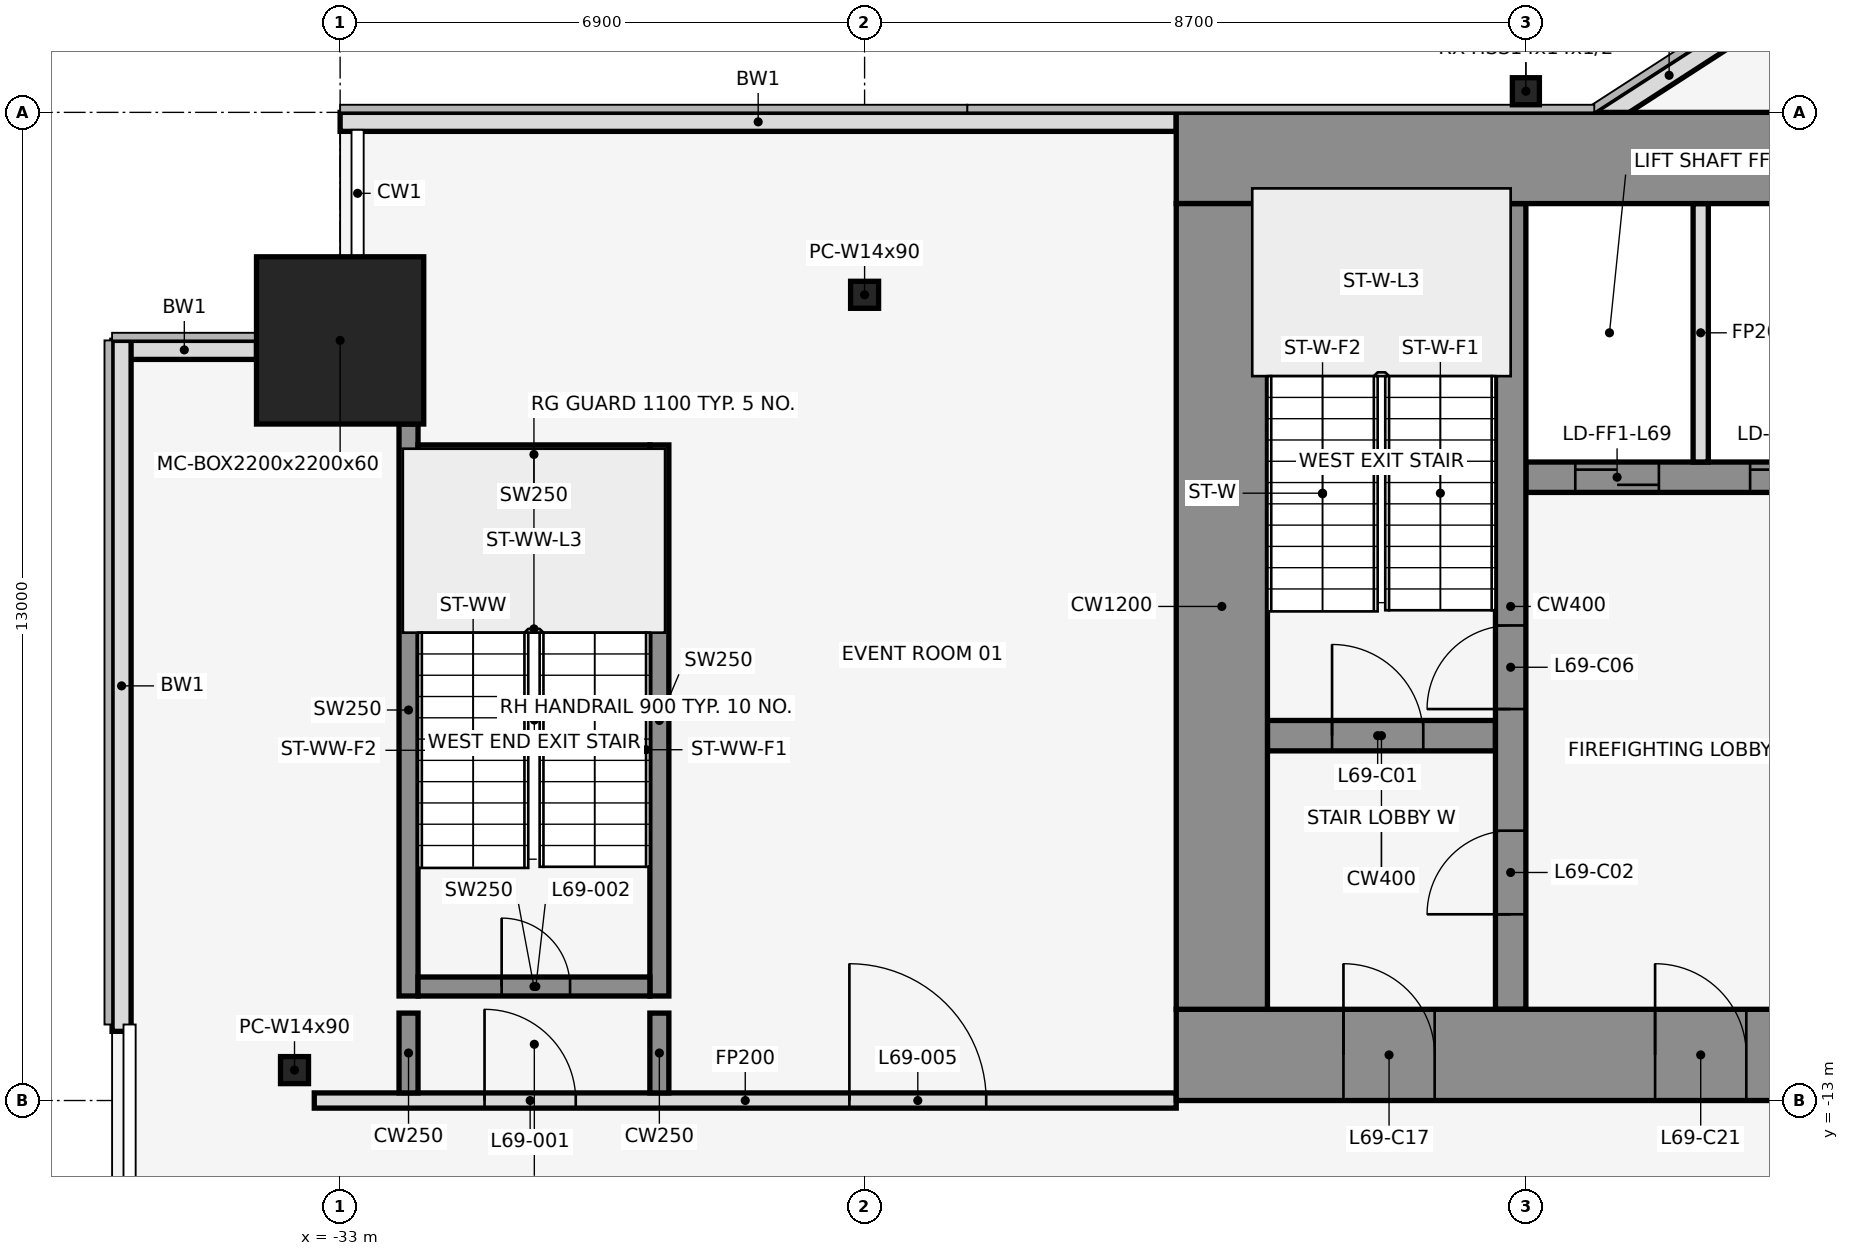
"""IFC4 building model, lengths in metres.
Left out: names, types, materials, properties, quantities, classifications, styles, units other than length and angle.
Written with IfcOpenShell. Run it as: python <this file> out.ifc"""

import sys

from ifc_helpers import new_model, si_unit, direction, frame, frame_2d, origin, origin_2d, place, context, subcontext, project, spatial, rectangle, hollow_rectangle, i_section, extrude, element, fill, save


model = new_model("IFC4")
c1 = context("Model", 3, precision=1e-05, world=origin(), true_north=direction((0.0, 1.0)))
c2 = subcontext(c1, "Body", "Model", "MODEL_VIEW")
j1 = project(units=[si_unit("LENGTHUNIT", "METRE"), si_unit("PLANEANGLEUNIT", "RADIAN")], contexts=[c1])
p1 = place(None, origin())
s1 = spatial("IfcSite", under=j1, at=p1, CompositionType="ELEMENT")
p2 = place(p1, origin())
s2 = spatial("IfcBuilding", under=s1, at=p2, CompositionType="ELEMENT")
p3 = place(p2, frame((0.0, 0.0, 306.5)))
s3 = spatial("IfcBuildingStorey", under=s2, at=p3, CompositionType="ELEMENT", Elevation=306.5)
p4 = place(p3, frame((-33.0, -3.0, 0.0), z_axis=(0.0, 0.0, 1.0), x_axis=(1.0, 0.0, 0.0)))
e1 = element("IfcColumn", 1, at=p4, inside=s3, PredefinedType="COLUMN", context=c2, shape_type="SweptSolid", body=[
    extrude(hollow_rectangle(XDim=2.2, YDim=2.2, WallThickness=0.06, at=origin_2d()), origin(), (0.0, 0.0, 1.0), 4.5),
])
p5 = place(p3, frame((-26.1, -2.4, 0.0), z_axis=(0.0, 0.0, 1.0), x_axis=(1.0, 0.0, 0.0)))
e2 = element("IfcColumn", 2, at=p5, inside=s3, PredefinedType="COLUMN", context=c2, shape_type="SweptSolid", body=[
    extrude(i_section(OverallWidth=0.368, OverallDepth=0.356, WebThickness=0.011, FlangeThickness=0.018, at=origin_2d()), origin(), (0.0, 0.0, 1.0), 4.5),
])
p6 = place(p3, frame((-17.4, 0.278, 0.0), z_axis=(0.0, 0.0, 1.0), x_axis=(1.0, 0.0, 0.0)))
e3 = element("IfcColumn", 3, at=p6, inside=s3, PredefinedType="COLUMN", context=c2, shape_type="SweptSolid", body=[
    extrude(hollow_rectangle(XDim=0.356, YDim=0.356, WallThickness=0.012, at=origin_2d()), origin(), (0.0, 0.0, 1.0), 4.5),
])
p7 = place(p3, frame((-33.6, -12.6, 0.0), z_axis=(0.0, 0.0, 1.0), x_axis=(1.0, 0.0, 0.0)))
e4 = element("IfcColumn", 4, at=p7, inside=s3, PredefinedType="COLUMN", context=c2, shape_type="SweptSolid", body=[
    extrude(i_section(OverallWidth=0.368, OverallDepth=0.356, WebThickness=0.011, FlangeThickness=0.018, at=origin_2d()), origin(), (0.0, 0.0, 1.0), 4.5),
])
p8 = place(p3, frame((-14.599, 1.08, 0.0), z_axis=(0.0, 0.0, 1.0), x_axis=(-0.83981312244, -0.542875602121, 0.0)))
e5 = element("IfcWall", 5, at=p8, inside=s3, PredefinedType="STANDARD", context=c2, shape_type="SweptSolid", body=[
    extrude(rectangle(XDim=2.183, YDim=0.25, at=frame_2d((1.091, 0.0))), origin(), (0.0, 0.0, 1.0), 4.35),
])
p9 = place(p3, frame((-22.0, -0.125, 0.0), z_axis=(0.0, 0.0, 1.0), x_axis=(-1.0, 0.0, 0.0)))
e6 = element("IfcWall", 6, at=p9, inside=s3, PredefinedType="STANDARD", context=c2, shape_type="SweptSolid", body=[
    extrude(rectangle(XDim=11.0, YDim=0.25, at=frame_2d((5.5, 0.0))), origin(), (0.0, 0.0, 1.0), 4.35),
])
p10 = place(p3, frame((-34.1, -3.125, 0.0), z_axis=(0.0, 0.0, 1.0), x_axis=(-1.0, 0.0, 0.0)))
e7 = element("IfcWall", 7, at=p10, inside=s3, PredefinedType="STANDARD", context=c2, shape_type="SweptSolid", body=[
    extrude(rectangle(XDim=1.9, YDim=0.25, at=frame_2d((0.95, 0.0))), origin(), (0.0, 0.0, 1.0), 4.35),
])
p11 = place(p3, frame((-35.875, -3.0, 0.0), z_axis=(0.0, 0.0, 1.0), x_axis=(0.0, -1.0, 0.0)))
e8 = element("IfcWall", 8, at=p11, inside=s3, PredefinedType="STANDARD", context=c2, shape_type="SweptSolid", body=[
    extrude(rectangle(XDim=9.09, YDim=0.25, at=frame_2d((4.545, 0.0))), origin(), (0.0, 0.0, 1.0), 4.35),
])
p12 = place(p3, frame((-32.1, -11.625, 0.0), z_axis=(0.0, 0.0, 1.0), x_axis=(0.0, 1.0, 0.0)))
e9 = element("IfcWall", 9, at=p12, inside=s3, PredefinedType="SHEAR", context=c2, shape_type="SweptSolid", body=[
    extrude(rectangle(XDim=7.525, YDim=0.25, at=frame_2d((3.762, 0.0))), origin(), (0.0, 0.0, 1.0), 4.5),
])
p13 = place(p3, frame((-28.8, -11.625, 0.0), z_axis=(0.0, 0.0, 1.0), x_axis=(0.0, 1.0, 0.0)))
e10 = element("IfcWall", 10, at=p13, inside=s3, PredefinedType="SHEAR", context=c2, shape_type="SweptSolid", body=[
    extrude(rectangle(XDim=7.25, YDim=0.25, at=frame_2d((3.625, 0.0))), origin(), (0.0, 0.0, 1.0), 4.5),
])
p14 = place(p3, frame((-31.975, -11.5, 0.0), z_axis=(0.0, 0.0, 1.0), x_axis=(1.0, 0.0, 0.0)))
e11 = element("IfcWall", 11, at=p14, inside=s3, PredefinedType="SHEAR", context=c2, shape_type="SweptSolid", body=[
    extrude(rectangle(XDim=3.05, YDim=0.25, at=frame_2d((1.525, 0.0))), origin(), (0.0, 0.0, 1.0), 4.5),
])
p15 = place(p14, frame((1.1, 0.0, 0.0)))
e12 = element("IfcOpeningElement", 12, at=p15, cuts=e11, PredefinedType="OPENING", context=c2, shape_type="SweptSolid", body=[
    extrude(rectangle(XDim=0.9, YDim=2.1, at=frame_2d((0.45, 1.05))), frame((0.0, 0.137, 0.0), z_axis=(0.0, -1.0, 0.0), x_axis=(1.0, 0.0, 0.0)), (0.0, 0.0, 1.0), 0.274),
])
p16 = place(p3, frame((-31.975, -4.5, 0.0), z_axis=(0.0, 0.0, 1.0), x_axis=(1.0, 0.0, 0.0)))
e13 = element("IfcWall", 13, at=p16, inside=s3, PredefinedType="SHEAR", context=c2, shape_type="SweptSolid", body=[
    extrude(rectangle(XDim=3.05, YDim=0.25, at=frame_2d((1.525, 0.0))), origin(), (0.0, 0.0, 1.0), 4.5),
])
p17 = place(p3, frame((-33.34, -13.0, 0.0), z_axis=(0.0, 0.0, 1.0), x_axis=(1.0, 0.0, 0.0)))
e14 = element("IfcWall", 14, at=p17, inside=s3, PredefinedType="PARTITIONING", context=c2, shape_type="SweptSolid", body=[
    extrude(rectangle(XDim=11.34, YDim=0.2, at=frame_2d((5.67, 0.0))), origin(), (0.0, 0.0, 1.0), 3.418),
])
p18 = place(p17, frame((2.24, 0.0, 0.0)))
e15 = element("IfcOpeningElement", 15, at=p18, cuts=e14, PredefinedType="OPENING", context=c2, shape_type="SweptSolid", body=[
    extrude(rectangle(XDim=1.2, YDim=2.1, at=frame_2d((0.6, 1.05))), frame((0.0, 0.112, 0.0), z_axis=(0.0, -1.0, 0.0), x_axis=(1.0, 0.0, 0.0)), (0.0, 0.0, 1.0), 0.224),
])
p19 = place(p17, frame((7.04, 0.0, 0.0)))
e16 = element("IfcOpeningElement", 16, at=p19, cuts=e14, PredefinedType="OPENING", context=c2, shape_type="SweptSolid", body=[
    extrude(rectangle(XDim=1.8, YDim=2.1, at=frame_2d((0.9, 1.05))), frame((0.0, 0.112, 0.0), z_axis=(0.0, -1.0, 0.0), x_axis=(1.0, 0.0, 0.0)), (0.0, 0.0, 1.0), 0.224),
])
for number, where, z_axis, x_axis in (
    (17, (-32.1, -12.9, 0.0), (0.0, 0.0, 1.0), (0.0, 1.0, 0.0)),
    (18, (-28.8, -12.9, 0.0), (0.0, 0.0, 1.0), (0.0, 1.0, 0.0)),
):
    element("IfcWall", number, at=place(p3, frame(where, z_axis=z_axis, x_axis=x_axis)), inside=s3, PredefinedType="SHEAR", context=c2, shape_type="SweptSolid", body=[
        extrude(rectangle(XDim=1.05, YDim=0.25, at=frame_2d((0.525, 0.0))), origin(), (0.0, 0.0, 1.0), 4.5),
    ])
p20 = place(p3, frame((-20.8, -8.2, 0.0), z_axis=(0.0, 0.0, 1.0), x_axis=(1.0, 0.0, 0.0)))
e19 = element("IfcWall", 19, at=p20, inside=s3, PredefinedType="SHEAR", context=c2, shape_type="SweptSolid", body=[
    extrude(rectangle(XDim=3.0, YDim=0.4, at=frame_2d((1.5, 0.0))), origin(), (0.0, 0.0, 1.0), 4.5),
])
p21 = place(p20, frame((0.85, 0.0, 0.0)))
e20 = element("IfcOpeningElement", 20, at=p21, cuts=e19, PredefinedType="OPENING", context=c2, shape_type="SweptSolid", body=[
    extrude(rectangle(XDim=1.2, YDim=2.1, at=frame_2d((0.6, 1.05))), frame((0.0, 0.212, 0.0), z_axis=(0.0, -1.0, 0.0), x_axis=(1.0, 0.0, 0.0)), (0.0, 0.0, 1.0), 0.424),
])
p22 = place(p3, frame((-17.4, -4.8, 0.0), z_axis=(0.0, 0.0, 1.0), x_axis=(1.0, 0.0, 0.0)))
e21 = element("IfcWall", 21, at=p22, inside=s3, PredefinedType="SHEAR", context=c2, shape_type="SweptSolid", body=[
    extrude(rectangle(XDim=13.6, YDim=0.4, at=frame_2d((6.8, 0.0))), origin(), (0.0, 0.0, 1.0), 4.5),
])
p23 = place(p22, frame((0.65, 0.0, 0.0)))
e22 = element("IfcOpeningElement", 22, at=p23, cuts=e21, PredefinedType="OPENING", context=c2, shape_type="SweptSolid", body=[
    extrude(rectangle(XDim=1.1, YDim=2.1, at=frame_2d((0.55, 1.05))), frame((0.0, 0.212, 0.0), z_axis=(0.0, -1.0, 0.0), x_axis=(1.0, 0.0, 0.0)), (0.0, 0.0, 1.0), 0.424),
])
p24 = place(p22, frame((2.95, 0.0, 0.0)))
e23 = element("IfcOpeningElement", 23, at=p24, cuts=e21, PredefinedType="OPENING", context=c2, shape_type="SweptSolid", body=[
    extrude(rectangle(XDim=1.1, YDim=2.1, at=frame_2d((0.55, 1.05))), frame((0.0, 0.212, 0.0), z_axis=(0.0, -1.0, 0.0), x_axis=(1.0, 0.0, 0.0)), (0.0, 0.0, 1.0), 0.424),
])
p25 = place(p22, frame((8.75, 0.0, 0.0)))
e24 = element("IfcOpeningElement", 24, at=p25, cuts=e21, PredefinedType="OPENING", context=c2, shape_type="SweptSolid", body=[
    extrude(rectangle(XDim=0.9, YDim=2.1, at=frame_2d((0.45, 1.05))), frame((0.0, 0.212, 0.0), z_axis=(0.0, -1.0, 0.0), x_axis=(1.0, 0.0, 0.0)), (0.0, 0.0, 1.0), 0.424),
])
p26 = place(p3, frame((-17.6, -11.8, 0.0), z_axis=(0.0, 0.0, 1.0), x_axis=(0.0, 1.0, 0.0)))
e25 = element("IfcWall", 25, at=p26, inside=s3, PredefinedType="SHEAR", context=c2, shape_type="SweptSolid", body=[
    extrude(rectangle(XDim=10.6, YDim=0.4, at=frame_2d((5.3, 0.0))), origin(), (0.0, 0.0, 1.0), 4.5),
])
p27 = place(p26, frame((1.25, 0.0, 0.0)))
e26 = element("IfcOpeningElement", 26, at=p27, cuts=e25, PredefinedType="OPENING", context=c2, shape_type="SweptSolid", body=[
    extrude(rectangle(XDim=1.1, YDim=2.1, at=frame_2d((0.55, 1.05))), frame((0.0, 0.212, 0.0), z_axis=(0.0, -1.0, 0.0), x_axis=(1.0, 0.0, 0.0)), (0.0, 0.0, 1.0), 0.424),
])
p28 = place(p26, frame((3.95, 0.0, 0.0)))
e27 = element("IfcOpeningElement", 27, at=p28, cuts=e25, PredefinedType="OPENING", context=c2, shape_type="SweptSolid", body=[
    extrude(rectangle(XDim=1.1, YDim=2.1, at=frame_2d((0.55, 1.05))), frame((0.0, 0.212, 0.0), z_axis=(0.0, -1.0, 0.0), x_axis=(1.0, 0.0, 0.0)), (0.0, 0.0, 1.0), 0.424),
])
p29 = place(p3, frame((-15.1, -4.6, 0.0), z_axis=(0.0, 0.0, 1.0), x_axis=(0.0, 1.0, 0.0)))
e28 = element("IfcWall", 28, at=p29, inside=s3, PredefinedType="PARTITIONING", context=c2, shape_type="SweptSolid", body=[
    extrude(rectangle(XDim=3.4, YDim=0.2, at=frame_2d((1.7, 0.0))), origin(), (0.0, 0.0, 1.0), 3.418),
])
p30 = place(p3, frame((-22.0, -0.6, 0.0), z_axis=(0.0, 0.0, 1.0), x_axis=(1.0, 0.0, 0.0)))
e29 = element("IfcWall", 29, at=p30, inside=s3, PredefinedType="SHEAR", context=c2, shape_type="SweptSolid", body=[
    extrude(rectangle(XDim=44.0, YDim=1.2, at=frame_2d((22.0, 0.0))), origin(), (0.0, 0.0, 1.0), 4.5),
])
p31 = place(p30, frame((18.55, 0.0, 0.0)))
e30 = element("IfcOpeningElement", 30, at=p31, cuts=e29, PredefinedType="OPENING", context=c2, shape_type="SweptSolid", body=[
    extrude(rectangle(XDim=0.9, YDim=2.1, at=frame_2d((0.45, 1.05))), frame((0.0, 0.612, 0.0), z_axis=(0.0, -1.0, 0.0), x_axis=(1.0, 0.0, 0.0)), (0.0, 0.0, 1.0), 1.224),
])
p32 = place(p30, frame((24.55, 0.0, 0.0)))
e31 = element("IfcOpeningElement", 31, at=p32, cuts=e29, PredefinedType="OPENING", context=c2, shape_type="SweptSolid", body=[
    extrude(rectangle(XDim=0.9, YDim=2.1, at=frame_2d((0.45, 1.05))), frame((0.0, 0.612, 0.0), z_axis=(0.0, -1.0, 0.0), x_axis=(1.0, 0.0, 0.0)), (0.0, 0.0, 1.0), 1.224),
])
p33 = place(p3, frame((-22.0, -12.4, 0.0), z_axis=(0.0, 0.0, 1.0), x_axis=(1.0, 0.0, 0.0)))
e32 = element("IfcWall", 32, at=p33, inside=s3, PredefinedType="SHEAR", context=c2, shape_type="SweptSolid", body=[
    extrude(rectangle(XDim=44.0, YDim=1.2, at=frame_2d((22.0, 0.0))), origin(), (0.0, 0.0, 1.0), 4.5),
])
p34 = place(p33, frame((2.2, 0.0, 0.0)))
e33 = element("IfcOpeningElement", 33, at=p34, cuts=e32, PredefinedType="OPENING", context=c2, shape_type="SweptSolid", body=[
    extrude(rectangle(XDim=1.2, YDim=2.1, at=frame_2d((0.6, 1.05))), frame((0.0, 0.612, 0.0), z_axis=(0.0, -1.0, 0.0), x_axis=(1.0, 0.0, 0.0)), (0.0, 0.0, 1.0), 1.224),
])
p35 = place(p33, frame((21.4, 0.0, 0.0)))
e34 = element("IfcOpeningElement", 34, at=p35, cuts=e32, PredefinedType="OPENING", context=c2, shape_type="SweptSolid", body=[
    extrude(rectangle(XDim=1.2, YDim=2.1, at=frame_2d((0.6, 1.05))), frame((0.0, 0.612, 0.0), z_axis=(0.0, -1.0, 0.0), x_axis=(1.0, 0.0, 0.0)), (0.0, 0.0, 1.0), 1.224),
])
p36 = place(p33, frame((40.6, 0.0, 0.0)))
e35 = element("IfcOpeningElement", 35, at=p36, cuts=e32, PredefinedType="OPENING", context=c2, shape_type="SweptSolid", body=[
    extrude(rectangle(XDim=1.2, YDim=2.1, at=frame_2d((0.6, 1.05))), frame((0.0, 0.612, 0.0), z_axis=(0.0, -1.0, 0.0), x_axis=(1.0, 0.0, 0.0)), (0.0, 0.0, 1.0), 1.224),
])
p37 = place(p33, frame((16.0, 0.0, 0.0)))
e36 = element("IfcOpeningElement", 36, at=p37, cuts=e32, PredefinedType="OPENING", context=c2, shape_type="SweptSolid", body=[
    extrude(rectangle(XDim=1.8, YDim=2.1, at=frame_2d((0.9, 1.05))), frame((0.0, 0.612, 0.0), z_axis=(0.0, -1.0, 0.0), x_axis=(1.0, 0.0, 0.0)), (0.0, 0.0, 1.0), 1.224),
])
p38 = place(p33, frame((6.3, 0.0, 0.0)))
e37 = element("IfcOpeningElement", 37, at=p38, cuts=e32, PredefinedType="OPENING", context=c2, shape_type="SweptSolid", body=[
    extrude(rectangle(XDim=1.2, YDim=2.1, at=frame_2d((0.6, 1.05))), frame((0.0, 0.612, 0.0), z_axis=(0.0, -1.0, 0.0), x_axis=(1.0, 0.0, 0.0)), (0.0, 0.0, 1.0), 1.224),
])
p39 = place(p33, frame((26.2, 0.0, 0.0)))
e38 = element("IfcOpeningElement", 38, at=p39, cuts=e32, PredefinedType="OPENING", context=c2, shape_type="SweptSolid", body=[
    extrude(rectangle(XDim=1.8, YDim=2.1, at=frame_2d((0.9, 1.05))), frame((0.0, 0.612, 0.0), z_axis=(0.0, -1.0, 0.0), x_axis=(1.0, 0.0, 0.0)), (0.0, 0.0, 1.0), 1.224),
])
p40 = place(p33, frame((36.5, 0.0, 0.0)))
e39 = element("IfcOpeningElement", 39, at=p40, cuts=e32, PredefinedType="OPENING", context=c2, shape_type="SweptSolid", body=[
    extrude(rectangle(XDim=1.2, YDim=2.1, at=frame_2d((0.6, 1.05))), frame((0.0, 0.612, 0.0), z_axis=(0.0, -1.0, 0.0), x_axis=(1.0, 0.0, 0.0)), (0.0, 0.0, 1.0), 1.224),
])
p41 = place(p3, frame((-21.4, -11.8, 0.0), z_axis=(0.0, 0.0, 1.0), x_axis=(0.0, 1.0, 0.0)))
e40 = element("IfcWall", 40, at=p41, inside=s3, PredefinedType="SHEAR", context=c2, shape_type="SweptSolid", body=[
    extrude(rectangle(XDim=10.6, YDim=1.2, at=frame_2d((5.3, 0.0))), origin(), (0.0, 0.0, 1.0), 4.5),
])
p42 = place(p18, origin())
e41 = element("IfcDoor", 41, at=p42, inside=s3, OperationType="SINGLE_SWING_LEFT", PredefinedType="DOOR", context=c2, shape_type="SweptSolid", body=[
    extrude(rectangle(XDim=1.2, YDim=2.1, at=frame_2d((0.6, 1.05))), frame((0.0, 0.025, 0.0), z_axis=(0.0, -1.0, 0.0), x_axis=(1.0, 0.0, 0.0)), (0.0, 0.0, 1.0), 0.05),
])
fill(e15, e41)
p43 = place(p15, origin())
e42 = element("IfcDoor", 42, at=p43, inside=s3, OperationType="SINGLE_SWING_LEFT", PredefinedType="DOOR", context=c2, shape_type="SweptSolid", body=[
    extrude(rectangle(XDim=0.9, YDim=2.1, at=frame_2d((0.45, 1.05))), frame((0.0, 0.025, 0.0), z_axis=(0.0, -1.0, 0.0), x_axis=(1.0, 0.0, 0.0)), (0.0, 0.0, 1.0), 0.05),
])
fill(e12, e42)
p44 = place(p19, origin())
e43 = element("IfcDoor", 43, at=p44, inside=s3, OperationType="SINGLE_SWING_LEFT", PredefinedType="DOOR", context=c2, shape_type="SweptSolid", body=[
    extrude(rectangle(XDim=1.8, YDim=2.1, at=frame_2d((0.9, 1.05))), frame((0.0, 0.025, 0.0), z_axis=(0.0, -1.0, 0.0), x_axis=(1.0, 0.0, 0.0)), (0.0, 0.0, 1.0), 0.05),
])
fill(e16, e43)
p45 = place(p21, origin())
e44 = element("IfcDoor", 44, at=p45, inside=s3, OperationType="SINGLE_SWING_LEFT", PredefinedType="DOOR", context=c2, shape_type="SweptSolid", body=[
    extrude(rectangle(XDim=1.2, YDim=2.1, at=frame_2d((0.6, 1.05))), frame((0.0, 0.025, 0.0), z_axis=(0.0, -1.0, 0.0), x_axis=(1.0, 0.0, 0.0)), (0.0, 0.0, 1.0), 0.05),
])
fill(e20, e44)
p46 = place(p27, frame((1.1, 0.0, 0.0), z_axis=(0.0, 0.0, 1.0), x_axis=(-1.0, 0.0, 0.0)))
e45 = element("IfcDoor", 45, at=p46, inside=s3, OperationType="SINGLE_SWING_LEFT", PredefinedType="DOOR", context=c2, shape_type="SweptSolid", body=[
    extrude(rectangle(XDim=1.1, YDim=2.1, at=frame_2d((0.55, 1.05))), frame((0.0, 0.025, 0.0), z_axis=(0.0, -1.0, 0.0), x_axis=(1.0, 0.0, 0.0)), (0.0, 0.0, 1.0), 0.05),
])
fill(e26, e45)
p47 = place(p23, origin())
e46 = element("IfcDoor", 46, at=p47, inside=s3, OperationType="DOUBLE_DOOR_SLIDING", PredefinedType="DOOR", context=c2, shape_type="SweptSolid", body=[
    extrude(rectangle(XDim=1.1, YDim=2.1, at=frame_2d((0.55, 1.05))), frame((0.0, 0.025, 0.0), z_axis=(0.0, -1.0, 0.0), x_axis=(1.0, 0.0, 0.0)), (0.0, 0.0, 1.0), 0.05),
])
fill(e22, e46)
p48 = place(p24, origin())
e47 = element("IfcDoor", 47, at=p48, inside=s3, OperationType="DOUBLE_DOOR_SLIDING", PredefinedType="DOOR", context=c2, shape_type="SweptSolid", body=[
    extrude(rectangle(XDim=1.1, YDim=2.1, at=frame_2d((0.55, 1.05))), frame((0.0, 0.025, 0.0), z_axis=(0.0, -1.0, 0.0), x_axis=(1.0, 0.0, 0.0)), (0.0, 0.0, 1.0), 0.05),
])
fill(e23, e47)
p49 = place(p28, frame((1.1, 0.0, 0.0), z_axis=(0.0, 0.0, 1.0), x_axis=(-1.0, 0.0, 0.0)))
e48 = element("IfcDoor", 48, at=p49, inside=s3, OperationType="SINGLE_SWING_LEFT", PredefinedType="DOOR", context=c2, shape_type="SweptSolid", body=[
    extrude(rectangle(XDim=1.1, YDim=2.1, at=frame_2d((0.55, 1.05))), frame((0.0, 0.025, 0.0), z_axis=(0.0, -1.0, 0.0), x_axis=(1.0, 0.0, 0.0)), (0.0, 0.0, 1.0), 0.05),
])
fill(e27, e48)
p50 = place(p34, frame((1.2, 0.0, 0.0), z_axis=(0.0, 0.0, 1.0), x_axis=(-1.0, 0.0, 0.0)))
e49 = element("IfcDoor", 49, at=p50, inside=s3, OperationType="SINGLE_SWING_RIGHT", PredefinedType="DOOR", context=c2, shape_type="SweptSolid", body=[
    extrude(rectangle(XDim=1.2, YDim=2.1, at=frame_2d((0.6, 1.05))), frame((0.0, 0.025, 0.0), z_axis=(0.0, -1.0, 0.0), x_axis=(1.0, 0.0, 0.0)), (0.0, 0.0, 1.0), 0.05),
])
fill(e33, e49)
p51 = place(p38, frame((1.2, 0.0, 0.0), z_axis=(0.0, 0.0, 1.0), x_axis=(-1.0, 0.0, 0.0)))
e50 = element("IfcDoor", 50, at=p51, inside=s3, OperationType="SINGLE_SWING_RIGHT", PredefinedType="DOOR", context=c2, shape_type="SweptSolid", body=[
    extrude(rectangle(XDim=1.2, YDim=2.1, at=frame_2d((0.6, 1.05))), frame((0.0, 0.025, 0.0), z_axis=(0.0, -1.0, 0.0), x_axis=(1.0, 0.0, 0.0)), (0.0, 0.0, 1.0), 0.05),
])
fill(e37, e50)
save(model, sys.argv[1])
